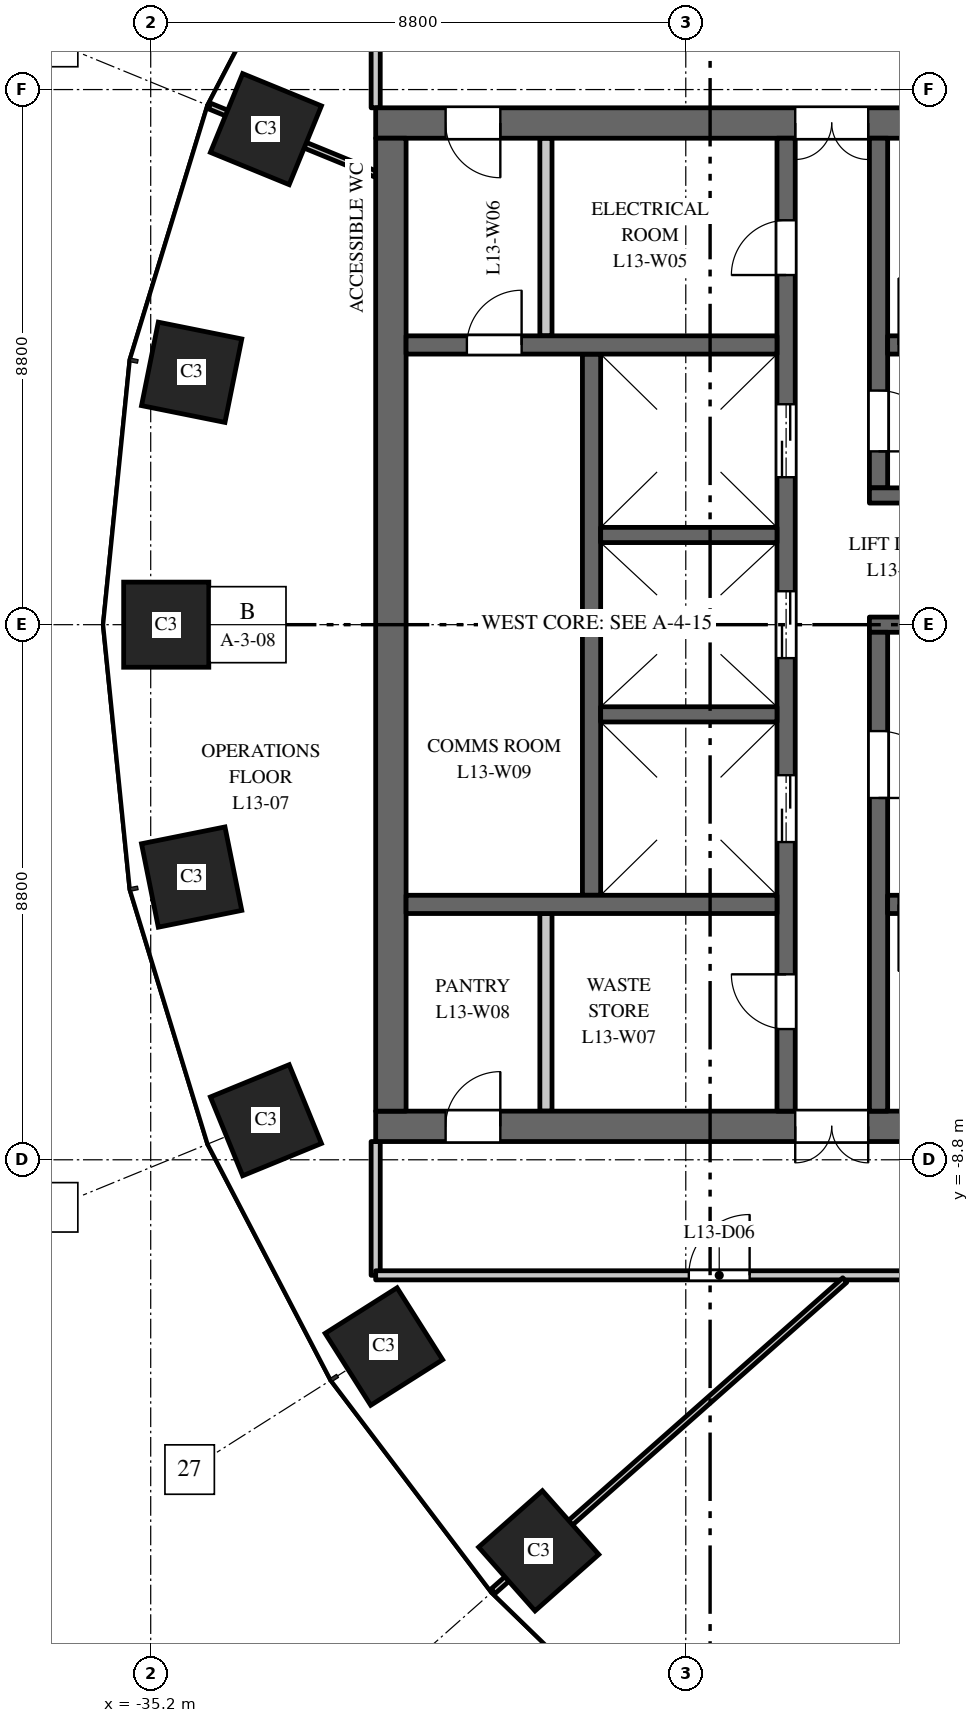
"""IFC4 building model, lengths in metres.
Left out: names, types, materials, properties, quantities, classifications, styles, units other than length and angle.
Written with IfcOpenShell. Run it as: python <this file> out.ifc"""

import sys

from ifc_helpers import new_model, si_unit, direction, frame, frame_2d, origin, origin_2d, place, context, subcontext, project, spatial, rectangle, extrude, element, fill, save


model = new_model("IFC4")
c1 = context("Model", 3, precision=1e-05, world=origin(), true_north=direction((0.0, 1.0)))
c2 = subcontext(c1, "Body", "Model", "MODEL_VIEW")
j1 = project(units=[si_unit("LENGTHUNIT", "METRE"), si_unit("PLANEANGLEUNIT", "RADIAN")], contexts=[c1])
p1 = place(None, origin())
s1 = spatial("IfcSite", under=j1, at=p1, CompositionType="ELEMENT")
p2 = place(p1, origin())
s2 = spatial("IfcBuilding", under=s1, at=p2, CompositionType="ELEMENT")
p3 = place(p2, frame((0.0, 0.0, 62.5)))
s3 = spatial("IfcBuildingStorey", under=s2, at=p3, CompositionType="ELEMENT", Elevation=62.5)
for number, where, z_axis, x_axis in (
    (1, (-33.305, 8.149, 0.0), (0.0, 0.0, 1.0), (-0.379, -0.925, 0.0)),
    (2, (-34.527, 4.151, 0.0), (0.0, 0.0, 1.0), (-0.197, -0.98, 0.0)),
    (3, (-34.945, 0.0, 0.0), (0.0, 0.0, 1.0), (0.0, -1.0, 0.0)),
    (4, (-34.527, -4.151, 0.0), (0.0, 0.0, 1.0), (0.197, -0.98, 0.0)),
    (5, (-33.305, -8.149, 0.0), (0.0, 0.0, 1.0), (0.379, -0.925, 0.0)),
    (6, (-31.365, -11.871, 0.0), (0.0, 0.0, 1.0), (0.535, -0.845, 0.0)),
    (7, (-28.819, -15.23, 0.0), (0.0, 0.0, 1.0), (0.663, -0.749, 0.0)),
):
    element("IfcColumn", number, at=place(p3, frame(where, z_axis=z_axis, x_axis=x_axis)), inside=s3, PredefinedType="COLUMN", context=c2, shape_type="SweptSolid", body=[
        extrude(rectangle(XDim=1.4, YDim=1.4, at=origin_2d()), origin(), (0.0, 0.0, 1.0), 4.0),
    ])
p4 = place(p3, frame((-16.5, 8.25, 0.0), z_axis=(0.0, 0.0, 1.0), x_axis=(-1.0, 0.0, 0.0)))
e8 = element("IfcWall", 8, at=p4, inside=s3, PredefinedType="SHEAR", context=c2, shape_type="SweptSolid", body=[
    extrude(rectangle(XDim=15.0, YDim=0.5, at=frame_2d((7.5, 0.0))), origin(), (0.0, 0.0, 1.0), 3.7),
])
p5 = place(p4, frame((6.9, 0.0, 0.0)))
e9 = element("IfcOpeningElement", 9, at=p5, cuts=e8, PredefinedType="OPENING", context=c2, shape_type="SweptSolid", body=[
    extrude(rectangle(XDim=1.2, YDim=2.1, at=frame_2d((0.6, 1.05))), frame((0.0, 0.26, 0.0), z_axis=(0.0, -1.0, 0.0), x_axis=(1.0, 0.0, 0.0)), (0.0, 0.0, 1.0), 0.52),
])
p6 = place(p4, frame((12.95, 0.0, 0.0)))
e10 = element("IfcOpeningElement", 10, at=p6, cuts=e8, PredefinedType="OPENING", context=c2, shape_type="SweptSolid", body=[
    extrude(rectangle(XDim=0.9, YDim=2.1, at=frame_2d((0.45, 1.05))), frame((0.0, 0.26, 0.0), z_axis=(0.0, -1.0, 0.0), x_axis=(1.0, 0.0, 0.0)), (0.0, 0.0, 1.0), 0.52),
])
p7 = place(p3, frame((-16.5, -8.25, 0.0), z_axis=(0.0, 0.0, 1.0), x_axis=(-1.0, 0.0, 0.0)))
e11 = element("IfcWall", 11, at=p7, inside=s3, PredefinedType="SHEAR", context=c2, shape_type="SweptSolid", body=[
    extrude(rectangle(XDim=15.0, YDim=0.5, at=frame_2d((7.5, 0.0))), origin(), (0.0, 0.0, 1.0), 3.7),
])
p8 = place(p7, frame((6.9, 0.0, 0.0)))
e12 = element("IfcOpeningElement", 12, at=p8, cuts=e11, PredefinedType="OPENING", context=c2, shape_type="SweptSolid", body=[
    extrude(rectangle(XDim=1.2, YDim=2.1, at=frame_2d((0.6, 1.05))), frame((0.0, 0.26, 0.0), z_axis=(0.0, -1.0, 0.0), x_axis=(1.0, 0.0, 0.0)), (0.0, 0.0, 1.0), 0.52),
])
p9 = place(p7, frame((12.95, 0.0, 0.0)))
e13 = element("IfcOpeningElement", 13, at=p9, cuts=e11, PredefinedType="OPENING", context=c2, shape_type="SweptSolid", body=[
    extrude(rectangle(XDim=0.9, YDim=2.1, at=frame_2d((0.45, 1.05))), frame((0.0, 0.26, 0.0), z_axis=(0.0, -1.0, 0.0), x_axis=(1.0, 0.0, 0.0)), (0.0, 0.0, 1.0), 0.52),
])
p10 = place(p3, frame((-27.95, -4.45, 0.0), z_axis=(0.0, 0.0, 1.0), x_axis=(0.0, 1.0, 0.0)))
e14 = element("IfcWall", 14, at=p10, inside=s3, PredefinedType="SHEAR", context=c2, shape_type="SweptSolid", body=[
    extrude(rectangle(XDim=8.9, YDim=0.3, at=frame_2d((4.45, 0.0))), origin(), (0.0, 0.0, 1.0), 3.7),
])
p11 = place(p3, frame((-24.75, -8.0, 0.0), z_axis=(0.0, 0.0, 1.0), x_axis=(0.0, 1.0, 0.0)))
e15 = element("IfcWall", 15, at=p11, inside=s3, PredefinedType="SHEAR", context=c2, shape_type="SweptSolid", body=[
    extrude(rectangle(XDim=16.0, YDim=0.3, at=frame_2d((8.0, 0.0))), origin(), (0.0, 0.0, 1.0), 3.7),
])
p12 = place(p11, frame((4.425, 0.0, 0.0)))
e16 = element("IfcOpeningElement", 16, at=p12, cuts=e15, PredefinedType="OPENING", context=c2, shape_type="SweptSolid", body=[
    extrude(rectangle(XDim=1.1, YDim=2.1, at=frame_2d((0.55, 1.05))), frame((0.0, 0.16, 0.0), z_axis=(0.0, -1.0, 0.0), x_axis=(1.0, 0.0, 0.0)), (0.0, 0.0, 1.0), 0.32),
])
p13 = place(p11, frame((7.45, 0.0, 0.0)))
e17 = element("IfcOpeningElement", 17, at=p13, cuts=e15, PredefinedType="OPENING", context=c2, shape_type="SweptSolid", body=[
    extrude(rectangle(XDim=1.1, YDim=2.1, at=frame_2d((0.55, 1.05))), frame((0.0, 0.16, 0.0), z_axis=(0.0, -1.0, 0.0), x_axis=(1.0, 0.0, 0.0)), (0.0, 0.0, 1.0), 0.32),
])
p14 = place(p11, frame((10.425, 0.0, 0.0)))
e18 = element("IfcOpeningElement", 18, at=p14, cuts=e15, PredefinedType="OPENING", context=c2, shape_type="SweptSolid", body=[
    extrude(rectangle(XDim=1.2, YDim=2.1, at=frame_2d((0.6, 1.05))), frame((0.0, 0.16, 0.0), z_axis=(0.0, -1.0, 0.0), x_axis=(1.0, 0.0, 0.0)), (0.0, 0.0, 1.0), 0.32),
])
p15 = place(p11, frame((13.75, 0.0, 0.0)))
e19 = element("IfcOpeningElement", 19, at=p15, cuts=e15, PredefinedType="OPENING", context=c2, shape_type="SweptSolid", body=[
    extrude(rectangle(XDim=0.9, YDim=2.1, at=frame_2d((0.45, 1.05))), frame((0.0, 0.16, 0.0), z_axis=(0.0, -1.0, 0.0), x_axis=(1.0, 0.0, 0.0)), (0.0, 0.0, 1.0), 0.32),
])
p16 = place(p11, frame((1.35, 0.0, 0.0)))
e20 = element("IfcOpeningElement", 20, at=p16, cuts=e15, PredefinedType="OPENING", context=c2, shape_type="SweptSolid", body=[
    extrude(rectangle(XDim=0.9, YDim=2.1, at=frame_2d((0.45, 1.05))), frame((0.0, 0.16, 0.0), z_axis=(0.0, -1.0, 0.0), x_axis=(1.0, 0.0, 0.0)), (0.0, 0.0, 1.0), 0.32),
])
p17 = place(p3, frame((-20.1, 0.0, 0.0), z_axis=(0.0, 0.0, 1.0), x_axis=(-1.0, 0.0, 0.0)))
e21 = element("IfcWall", 21, at=p17, inside=s3, PredefinedType="SHEAR", context=c2, shape_type="SweptSolid", body=[
    extrude(rectangle(XDim=3.28, YDim=0.25, at=frame_2d((1.64, 0.0))), origin(), (0.0, 0.0, 1.0), 3.7),
])
p18 = place(p3, frame((-31.25, -8.0, 0.0), z_axis=(0.0, 0.0, 1.0), x_axis=(0.0, 1.0, 0.0)))
e22 = element("IfcWall", 22, at=p18, inside=s3, PredefinedType="SHEAR", context=c2, shape_type="SweptSolid", body=[
    extrude(rectangle(XDim=16.0, YDim=0.5, at=frame_2d((8.0, 0.0))), origin(), (0.0, 0.0, 1.0), 3.7),
])
p19 = place(p3, frame((-24.9, 4.6, 0.0), z_axis=(0.0, 0.0, 1.0), x_axis=(-1.0, 0.0, 0.0)))
e23 = element("IfcWall", 23, at=p19, inside=s3, PredefinedType="SHEAR", context=c2, shape_type="SweptSolid", body=[
    extrude(rectangle(XDim=6.1, YDim=0.3, at=frame_2d((3.05, 0.0))), origin(), (0.0, 0.0, 1.0), 3.7),
])
p20 = place(p19, frame((4.2, 0.0, 0.0)))
e24 = element("IfcOpeningElement", 24, at=p20, cuts=e23, PredefinedType="OPENING", context=c2, shape_type="SweptSolid", body=[
    extrude(rectangle(XDim=0.9, YDim=2.1, at=frame_2d((0.45, 1.05))), frame((0.0, 0.16, 0.0), z_axis=(0.0, -1.0, 0.0), x_axis=(1.0, 0.0, 0.0)), (0.0, 0.0, 1.0), 0.32),
])
for number, where, z_axis, x_axis in (
    (25, (-28.7, 4.75, 0.0), (0.0, 0.0, 1.0), (0.0, 1.0, 0.0)),
    (26, (-28.7, -8.0, 0.0), (0.0, 0.0, 1.0), (0.0, 1.0, 0.0)),
):
    element("IfcWall", number, at=place(p3, frame(where, z_axis=z_axis, x_axis=x_axis)), inside=s3, PredefinedType="PARTITIONING", context=c2, shape_type="SweptSolid", body=[
        extrude(rectangle(XDim=3.25, YDim=0.2, at=frame_2d((1.625, 0.0))), origin(), (0.0, 0.0, 1.0), 3.7),
    ])
p21 = place(p3, frame((-24.9, -4.6, 0.0), z_axis=(0.0, 0.0, 1.0), x_axis=(-1.0, 0.0, 0.0)))
e27 = element("IfcWall", 27, at=p21, inside=s3, PredefinedType="SHEAR", context=c2, shape_type="SweptSolid", body=[
    extrude(rectangle(XDim=6.1, YDim=0.3, at=frame_2d((3.05, 0.0))), origin(), (0.0, 0.0, 1.0), 3.7),
])
for number, where, z_axis, x_axis in (
    (28, (-24.9, -1.475, 0.0), (0.0, 0.0, 1.0), (-1.0, 0.0, 0.0)),
    (29, (-24.9, 1.475, 0.0), (0.0, 0.0, 1.0), (-1.0, 0.0, 0.0)),
):
    element("IfcWall", number, at=place(p3, frame(where, z_axis=z_axis, x_axis=x_axis)), inside=s3, PredefinedType="SHEAR", context=c2, shape_type="SweptSolid", body=[
        extrude(rectangle(XDim=2.9, YDim=0.25, at=frame_2d((1.45, 0.0))), origin(), (0.0, 0.0, 1.0), 3.7),
    ])
p22 = place(p3, frame((-23.23, 2.25, 0.0), z_axis=(0.0, 0.0, 1.0), x_axis=(0.0, 1.0, 0.0)))
e30 = element("IfcWall", 30, at=p22, inside=s3, PredefinedType="SHEAR", context=c2, shape_type="SweptSolid", body=[
    extrude(rectangle(XDim=5.75, YDim=0.3, at=frame_2d((2.875, 0.0))), origin(), (0.0, 0.0, 1.0), 3.7),
])
p23 = place(p22, frame((0.6, 0.0, 0.0)))
e31 = element("IfcOpeningElement", 31, at=p23, cuts=e30, PredefinedType="OPENING", context=c2, shape_type="SweptSolid", body=[
    extrude(rectangle(XDim=1.0, YDim=2.1, at=frame_2d((0.5, 1.05))), frame((0.0, 0.16, 0.0), z_axis=(0.0, -1.0, 0.0), x_axis=(1.0, 0.0, 0.0)), (0.0, 0.0, 1.0), 0.32),
])
p24 = place(p3, frame((-23.23, -8.0, 0.0), z_axis=(0.0, 0.0, 1.0), x_axis=(0.0, 1.0, 0.0)))
e32 = element("IfcWall", 32, at=p24, inside=s3, PredefinedType="SHEAR", context=c2, shape_type="SweptSolid", body=[
    extrude(rectangle(XDim=7.875, YDim=0.3, at=frame_2d((3.938, 0.0))), origin(), (0.0, 0.0, 1.0), 3.7),
])
p25 = place(p24, frame((5.15, 0.0, 0.0)))
e33 = element("IfcOpeningElement", 33, at=p25, cuts=e32, PredefinedType="OPENING", context=c2, shape_type="SweptSolid", body=[
    extrude(rectangle(XDim=1.1, YDim=2.1, at=frame_2d((0.55, 1.05))), frame((0.0, 0.16, 0.0), z_axis=(0.0, -1.0, 0.0), x_axis=(1.0, 0.0, 0.0)), (0.0, 0.0, 1.0), 0.32),
])
p26 = place(p3, frame((-16.9, 4.6, 0.0), z_axis=(0.0, 0.0, 1.0), x_axis=(-1.0, 0.0, 0.0)))
e34 = element("IfcWall", 34, at=p26, inside=s3, PredefinedType="SHEAR", context=c2, shape_type="SweptSolid", body=[
    extrude(rectangle(XDim=6.18, YDim=0.3, at=frame_2d((3.09, 0.0))), origin(), (0.0, 0.0, 1.0), 3.7),
])
p27 = place(p26, frame((4.9, 0.0, 0.0)))
e35 = element("IfcOpeningElement", 35, at=p27, cuts=e34, PredefinedType="OPENING", context=c2, shape_type="SweptSolid", body=[
    extrude(rectangle(XDim=1.1, YDim=2.1, at=frame_2d((0.55, 1.05))), frame((0.0, 0.16, 0.0), z_axis=(0.0, -1.0, 0.0), x_axis=(1.0, 0.0, 0.0)), (0.0, 0.0, 1.0), 0.32),
])
p28 = place(p3, frame((-16.9, -4.6, 0.0), z_axis=(0.0, 0.0, 1.0), x_axis=(-1.0, 0.0, 0.0)))
e36 = element("IfcWall", 36, at=p28, inside=s3, PredefinedType="SHEAR", context=c2, shape_type="SweptSolid", body=[
    extrude(rectangle(XDim=6.18, YDim=0.3, at=frame_2d((3.09, 0.0))), origin(), (0.0, 0.0, 1.0), 3.7),
])
p29 = place(p28, frame((4.9, 0.0, 0.0)))
e37 = element("IfcOpeningElement", 37, at=p29, cuts=e36, PredefinedType="OPENING", context=c2, shape_type="SweptSolid", body=[
    extrude(rectangle(XDim=1.1, YDim=2.1, at=frame_2d((0.55, 1.05))), frame((0.0, 0.16, 0.0), z_axis=(0.0, -1.0, 0.0), x_axis=(1.0, 0.0, 0.0)), (0.0, 0.0, 1.0), 0.32),
])
p30 = place(p3, frame((-20.85, 2.125, 0.0), z_axis=(0.0, 0.0, 1.0), x_axis=(-1.0, 0.0, 0.0)))
e38 = element("IfcWall", 38, at=p30, inside=s3, PredefinedType="SHEAR", context=c2, shape_type="SweptSolid", body=[
    extrude(rectangle(XDim=2.53, YDim=0.25, at=frame_2d((1.265, 0.0))), origin(), (0.0, 0.0, 1.0), 3.7),
])
p31 = place(p3, frame((-34.234, 8.53, 0.0), z_axis=(0.0, 0.0, 1.0), x_axis=(0.925344112436, -0.379128307542, 0.0)))
e39 = element("IfcWall", 39, at=p31, inside=s3, PredefinedType="PARTITIONING", context=c2, shape_type="SweptSolid", body=[
    extrude(rectangle(XDim=2.954, YDim=0.1, at=frame_2d((1.477, 0.0))), origin(), (0.0, 0.0, 1.0), 2.85),
])
p32 = place(p3, frame((-31.5, -10.7, 0.0), z_axis=(0.0, 0.0, 1.0), x_axis=(0.0, 1.0, 0.0)))
e40 = element("IfcWall", 40, at=p32, inside=s3, PredefinedType="PARTITIONING", context=c2, shape_type="SweptSolid", body=[
    extrude(rectangle(XDim=2.2, YDim=0.15, at=frame_2d((1.1, 0.0))), origin(), (0.0, 0.0, 1.0), 3.7),
])
p33 = place(p3, frame((-31.5, -10.7, 0.0), z_axis=(0.0, 0.0, 1.0), x_axis=(1.0, 0.0, 0.0)))
e41 = element("IfcWall", 41, at=p33, inside=s3, PredefinedType="PARTITIONING", context=c2, shape_type="SweptSolid", body=[
    extrude(rectangle(XDim=15.0, YDim=0.15, at=frame_2d((7.5, 0.0))), origin(), (0.0, 0.0, 1.0), 3.1),
])
p34 = place(p33, frame((5.15, 0.0, 0.0)))
e42 = element("IfcOpeningElement", 42, at=p34, cuts=e41, PredefinedType="OPENING", context=c2, shape_type="SweptSolid", body=[
    extrude(rectangle(XDim=1.0, YDim=2.1, at=frame_2d((0.5, 1.05))), frame((0.0, 0.085, 0.0), z_axis=(0.0, -1.0, 0.0), x_axis=(1.0, 0.0, 0.0)), (0.0, 0.0, 1.0), 0.17),
])
p35 = place(p3, frame((-31.5, 8.5, 0.0), z_axis=(0.0, 0.0, 1.0), x_axis=(0.0, 1.0, 0.0)))
e43 = element("IfcWall", 43, at=p35, inside=s3, PredefinedType="PARTITIONING", context=c2, shape_type="SweptSolid", body=[
    extrude(rectangle(XDim=2.2, YDim=0.15, at=frame_2d((1.1, 0.0))), origin(), (0.0, 0.0, 1.0), 3.7),
])
p36 = place(p3, frame((-29.569, -15.895, 0.0), z_axis=(0.0, 0.0, 1.0), x_axis=(0.748985701008, 0.662586160198, 0.0)))
e44 = element("IfcWall", 44, at=p36, inside=s3, PredefinedType="PARTITIONING", context=c2, shape_type="SweptSolid", body=[
    extrude(rectangle(XDim=7.723, YDim=0.1, at=frame_2d((3.861, 0.0))), origin(), (0.0, 0.0, 1.0), 2.85),
])
p37 = place(p12, origin())
e45 = element("IfcDoor", 45, at=p37, inside=s3, OperationType="DOUBLE_DOOR_SLIDING", PredefinedType="DOOR", context=c2, shape_type="SweptSolid", body=[
    extrude(rectangle(XDim=1.1, YDim=2.1, at=frame_2d((0.55, 1.05))), frame((0.0, 0.025, 0.0), z_axis=(0.0, -1.0, 0.0), x_axis=(1.0, 0.0, 0.0)), (0.0, 0.0, 1.0), 0.05),
])
fill(e16, e45)
p38 = place(p13, origin())
e46 = element("IfcDoor", 46, at=p38, inside=s3, OperationType="DOUBLE_DOOR_SLIDING", PredefinedType="DOOR", context=c2, shape_type="SweptSolid", body=[
    extrude(rectangle(XDim=1.1, YDim=2.1, at=frame_2d((0.55, 1.05))), frame((0.0, 0.025, 0.0), z_axis=(0.0, -1.0, 0.0), x_axis=(1.0, 0.0, 0.0)), (0.0, 0.0, 1.0), 0.05),
])
fill(e17, e46)
p39 = place(p14, origin())
e47 = element("IfcDoor", 47, at=p39, inside=s3, OperationType="DOUBLE_DOOR_SLIDING", PredefinedType="DOOR", context=c2, shape_type="SweptSolid", body=[
    extrude(rectangle(XDim=1.2, YDim=2.1, at=frame_2d((0.6, 1.05))), frame((0.0, 0.025, 0.0), z_axis=(0.0, -1.0, 0.0), x_axis=(1.0, 0.0, 0.0)), (0.0, 0.0, 1.0), 0.05),
])
fill(e18, e47)
p40 = place(p27, origin())
e48 = element("IfcDoor", 48, at=p40, inside=s3, OperationType="SINGLE_SWING_RIGHT", PredefinedType="DOOR", context=c2, shape_type="SweptSolid", body=[
    extrude(rectangle(XDim=1.1, YDim=2.1, at=frame_2d((0.55, 1.05))), frame((0.0, 0.025, 0.0), z_axis=(0.0, -1.0, 0.0), x_axis=(1.0, 0.0, 0.0)), (0.0, 0.0, 1.0), 0.05),
])
fill(e35, e48)
p41 = place(p29, origin())
e49 = element("IfcDoor", 49, at=p41, inside=s3, OperationType="SINGLE_SWING_LEFT", PredefinedType="DOOR", context=c2, shape_type="SweptSolid", body=[
    extrude(rectangle(XDim=1.1, YDim=2.1, at=frame_2d((0.55, 1.05))), frame((0.0, 0.025, 0.0), z_axis=(0.0, -1.0, 0.0), x_axis=(1.0, 0.0, 0.0)), (0.0, 0.0, 1.0), 0.05),
])
fill(e37, e49)
p42 = place(p25, origin())
e50 = element("IfcDoor", 50, at=p42, inside=s3, OperationType="SINGLE_SWING_LEFT", PredefinedType="DOOR", context=c2, shape_type="SweptSolid", body=[
    extrude(rectangle(XDim=1.1, YDim=2.1, at=frame_2d((0.55, 1.05))), frame((0.0, 0.025, 0.0), z_axis=(0.0, -1.0, 0.0), x_axis=(1.0, 0.0, 0.0)), (0.0, 0.0, 1.0), 0.05),
])
fill(e33, e50)
p43 = place(p23, origin())
e51 = element("IfcDoor", 51, at=p43, inside=s3, OperationType="SINGLE_SWING_LEFT", PredefinedType="DOOR", context=c2, shape_type="SweptSolid", body=[
    extrude(rectangle(XDim=1.0, YDim=2.1, at=frame_2d((0.5, 1.05))), frame((0.0, 0.025, 0.0), z_axis=(0.0, -1.0, 0.0), x_axis=(1.0, 0.0, 0.0)), (0.0, 0.0, 1.0), 0.05),
])
fill(e31, e51)
p44 = place(p5, origin())
e52 = element("IfcDoor", 52, at=p44, inside=s3, OperationType="DOUBLE_DOOR_DOUBLE_SWING", PredefinedType="DOOR", context=c2, shape_type="SweptSolid", body=[
    extrude(rectangle(XDim=1.2, YDim=2.1, at=frame_2d((0.6, 1.05))), frame((0.0, 0.025, 0.0), z_axis=(0.0, -1.0, 0.0), x_axis=(1.0, 0.0, 0.0)), (0.0, 0.0, 1.0), 0.05),
])
fill(e9, e52)
p45 = place(p8, origin())
e53 = element("IfcDoor", 53, at=p45, inside=s3, OperationType="DOUBLE_DOOR_DOUBLE_SWING", PredefinedType="DOOR", context=c2, shape_type="SweptSolid", body=[
    extrude(rectangle(XDim=1.2, YDim=2.1, at=frame_2d((0.6, 1.05))), frame((0.0, 0.025, 0.0), z_axis=(0.0, -1.0, 0.0), x_axis=(1.0, 0.0, 0.0)), (0.0, 0.0, 1.0), 0.05),
])
fill(e12, e53)
p46 = place(p15, origin())
e54 = element("IfcDoor", 54, at=p46, inside=s3, OperationType="SINGLE_SWING_RIGHT", PredefinedType="DOOR", context=c2, shape_type="SweptSolid", body=[
    extrude(rectangle(XDim=0.9, YDim=2.1, at=frame_2d((0.45, 1.05))), frame((0.0, 0.025, 0.0), z_axis=(0.0, -1.0, 0.0), x_axis=(1.0, 0.0, 0.0)), (0.0, 0.0, 1.0), 0.05),
])
fill(e19, e54)
p47 = place(p6, origin())
e55 = element("IfcDoor", 55, at=p47, inside=s3, OperationType="SINGLE_SWING_RIGHT", PredefinedType="DOOR", context=c2, shape_type="SweptSolid", body=[
    extrude(rectangle(XDim=0.9, YDim=2.1, at=frame_2d((0.45, 1.05))), frame((0.0, 0.025, 0.0), z_axis=(0.0, -1.0, 0.0), x_axis=(1.0, 0.0, 0.0)), (0.0, 0.0, 1.0), 0.05),
])
fill(e10, e55)
p48 = place(p16, origin())
e56 = element("IfcDoor", 56, at=p48, inside=s3, OperationType="SINGLE_SWING_LEFT", PredefinedType="DOOR", context=c2, shape_type="SweptSolid", body=[
    extrude(rectangle(XDim=0.9, YDim=2.1, at=frame_2d((0.45, 1.05))), frame((0.0, 0.025, 0.0), z_axis=(0.0, -1.0, 0.0), x_axis=(1.0, 0.0, 0.0)), (0.0, 0.0, 1.0), 0.05),
])
fill(e20, e56)
p49 = place(p9, origin())
e57 = element("IfcDoor", 57, at=p49, inside=s3, OperationType="SINGLE_SWING_LEFT", PredefinedType="DOOR", context=c2, shape_type="SweptSolid", body=[
    extrude(rectangle(XDim=0.9, YDim=2.1, at=frame_2d((0.45, 1.05))), frame((0.0, 0.025, 0.0), z_axis=(0.0, -1.0, 0.0), x_axis=(1.0, 0.0, 0.0)), (0.0, 0.0, 1.0), 0.05),
])
fill(e13, e57)
p50 = place(p20, origin())
e58 = element("IfcDoor", 58, at=p50, inside=s3, OperationType="SINGLE_SWING_LEFT", PredefinedType="DOOR", context=c2, shape_type="SweptSolid", body=[
    extrude(rectangle(XDim=0.9, YDim=2.1, at=frame_2d((0.45, 1.05))), frame((0.0, 0.025, 0.0), z_axis=(0.0, -1.0, 0.0), x_axis=(1.0, 0.0, 0.0)), (0.0, 0.0, 1.0), 0.05),
])
fill(e24, e58)
p51 = place(p34, origin())
e59 = element("IfcDoor", 59, at=p51, inside=s3, OperationType="SINGLE_SWING_RIGHT", PredefinedType="DOOR", context=c2, shape_type="SweptSolid", body=[
    extrude(rectangle(XDim=1.0, YDim=2.1, at=frame_2d((0.5, 1.05))), frame((0.0, 0.025, 0.0), z_axis=(0.0, -1.0, 0.0), x_axis=(1.0, 0.0, 0.0)), (0.0, 0.0, 1.0), 0.05),
])
fill(e42, e59)
save(model, sys.argv[1])
